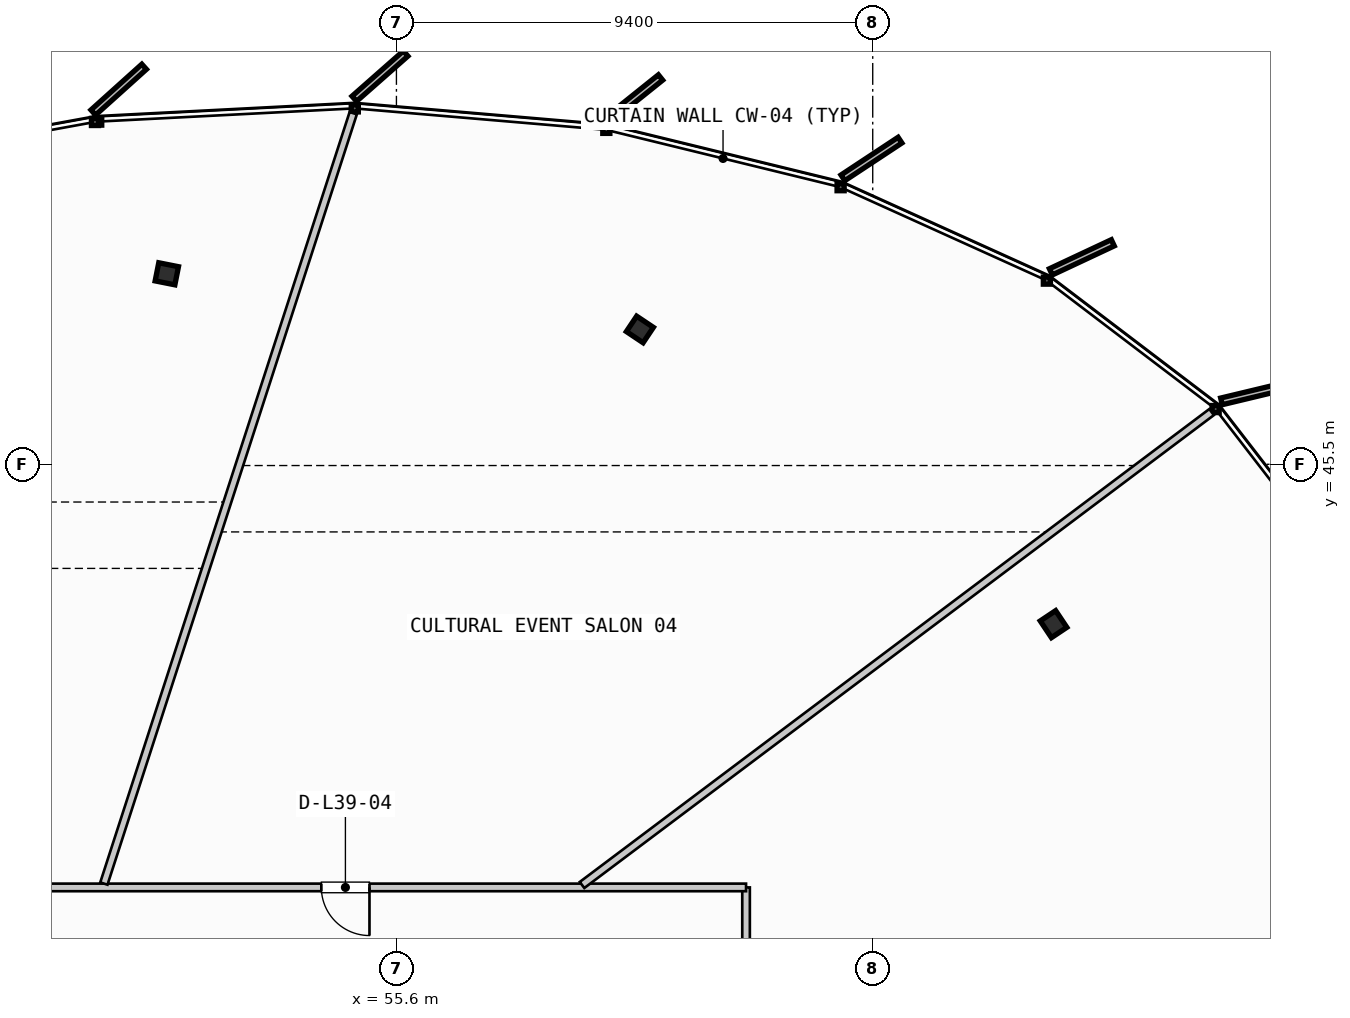
"""IFC4 building model, lengths in metres.
Left out: names, types, materials, properties, quantities, classifications, styles, units other than length and angle.
Written with IfcOpenShell. Run it as: python <this file> out.ifc"""

import sys

from ifc_helpers import new_model, si_unit, direction, frame, frame_2d, origin, origin_2d, place, context, subcontext, project, spatial, rectangle, i_section, extrude, source, transform, mapped, element, fill, save


model = new_model("IFC4")
c1 = context("Model", 3, precision=1e-05, world=origin(), true_north=direction((0.0, 1.0)))
c2 = subcontext(c1, "Body", "Model", "MODEL_VIEW")
j1 = project(units=[si_unit("LENGTHUNIT", "METRE"), si_unit("PLANEANGLEUNIT", "RADIAN")], contexts=[c1])
p1 = place(None, origin())
s1 = spatial("IfcSite", under=j1, at=p1, CompositionType="ELEMENT")
p2 = place(p1, origin())
s2 = spatial("IfcBuilding", under=s1, at=p2, CompositionType="ELEMENT")
p3 = place(p2, frame((0.0, 0.0, 153.65)))
s3 = spatial("IfcBuildingStorey", under=s2, at=p3, CompositionType="ELEMENT", Elevation=153.65)
m1 = source(origin(), c2, "Body", "SweptSolid", [
    extrude(i_section(OverallWidth=0.397, OverallDepth=0.365, WebThickness=0.028, FlangeThickness=0.044, FilletRadius=0.015, at=origin_2d()), origin(), (0.0, 0.0, 1.0), 3.3),
])
for number, where, z_axis, x_axis in (
    (1, (68.569, 42.345, 0.0), (0.0, 0.0, 1.0), (0.831, 0.556, 0.0)),
    (2, (60.405, 48.161, 0.0), (0.0, 0.0, 1.0), (0.556, 0.831, 0.0)),
    (3, (51.069, 49.259, 0.0), (0.0, 0.0, 1.0), (0.195, 0.981, 0.0)),
):
    element("IfcColumn", number, at=place(p3, frame(where, z_axis=z_axis, x_axis=x_axis)), inside=s3, PredefinedType="COLUMN", context=c2, shape_type="MappedRepresentation", body=[
        mapped(m1, transform((0.0, 0.0, 0.0), scale=1.0)),
    ])
p4 = place(p3, frame((62.5, 35.45, 0.0), z_axis=(0.0, 0.0, 1.0), x_axis=(0.0, 1.0, 0.0)))
e4 = element("IfcWall", 4, at=p4, inside=s3, PredefinedType="PARTITIONING", context=c2, shape_type="SweptSolid", body=[
    extrude(rectangle(XDim=1.7, YDim=0.15, at=frame_2d((0.85, 0.0))), origin(), (0.0, 0.0, 1.0), 2.28),
])
p5 = place(p3, frame((62.5, 37.15, 0.0), z_axis=(0.0, 0.0, 1.0), x_axis=(-1.0, 0.0, 0.0)))
e5 = element("IfcWall", 5, at=p5, inside=s3, PredefinedType="PARTITIONING", context=c2, shape_type="SweptSolid", body=[
    extrude(rectangle(XDim=31.4, YDim=0.15, at=frame_2d((15.7, 0.0))), origin(), (0.0, 0.0, 1.0), 2.28),
])
p6 = place(p5, frame((7.432, 0.0, 0.0)))
e6 = element("IfcOpeningElement", 6, at=p6, cuts=e5, PredefinedType="OPENING", context=c2, shape_type="SweptSolid", body=[
    extrude(rectangle(XDim=0.95, YDim=2.15, at=frame_2d((0.475, 1.075))), frame((0.0, 0.085, 0.0), z_axis=(0.0, -1.0, 0.0), x_axis=(1.0, 0.0, 0.0)), (0.0, 0.0, 1.0), 0.17),
])
p7 = place(p5, frame((20.164, 0.0, 0.0)))
e7 = element("IfcOpeningElement", 7, at=p7, cuts=e5, PredefinedType="OPENING", context=c2, shape_type="SweptSolid", body=[
    extrude(rectangle(XDim=0.95, YDim=2.15, at=frame_2d((0.475, 1.075))), frame((0.0, 0.085, 0.0), z_axis=(0.0, -1.0, 0.0), x_axis=(1.0, 0.0, 0.0)), (0.0, 0.0, 1.0), 0.17),
])
p8 = place(p3, frame((59.263, 37.198, 0.0), z_axis=(0.0, 0.0, 1.0), x_axis=(0.799573694143, 0.600567987521, 0.0)))
e8 = element("IfcWall", 8, at=p8, inside=s3, PredefinedType="PARTITIONING", context=c2, shape_type="SweptSolid", body=[
    extrude(rectangle(XDim=15.539, YDim=0.15, at=frame_2d((7.769, 0.0))), origin(), (0.0, 0.0, 1.0), 2.28),
])
p9 = place(p3, frame((49.826, 37.226, 0.0), z_axis=(0.0, 0.0, 1.0), x_axis=(0.307956150851, 0.951400551373, 0.0)))
e9 = element("IfcWall", 9, at=p9, inside=s3, PredefinedType="PARTITIONING", context=c2, shape_type="SweptSolid", body=[
    extrude(rectangle(XDim=15.979, YDim=0.15, at=frame_2d((7.99, 0.0))), origin(), (0.0, 0.0, 1.0), 2.28),
])
m2 = source(origin(), c2, "Body", "SweptSolid", [
    extrude(rectangle(XDim=0.95, YDim=2.15, at=frame_2d((0.475, 1.075))), frame((0.0, 0.025, 0.0), z_axis=(0.0, -1.0, 0.0), x_axis=(1.0, 0.0, 0.0)), (0.0, 0.0, 1.0), 0.05),
])
p10 = place(p6, origin())
e10 = element("IfcDoor", 10, at=p10, inside=s3, OperationType="SINGLE_SWING_LEFT", PredefinedType="DOOR", context=c2, shape_type="MappedRepresentation", body=[
    mapped(m2, transform((0.0, 0.0, 0.0), scale=1.0)),
])
fill(e6, e10)
save(model, sys.argv[1])
